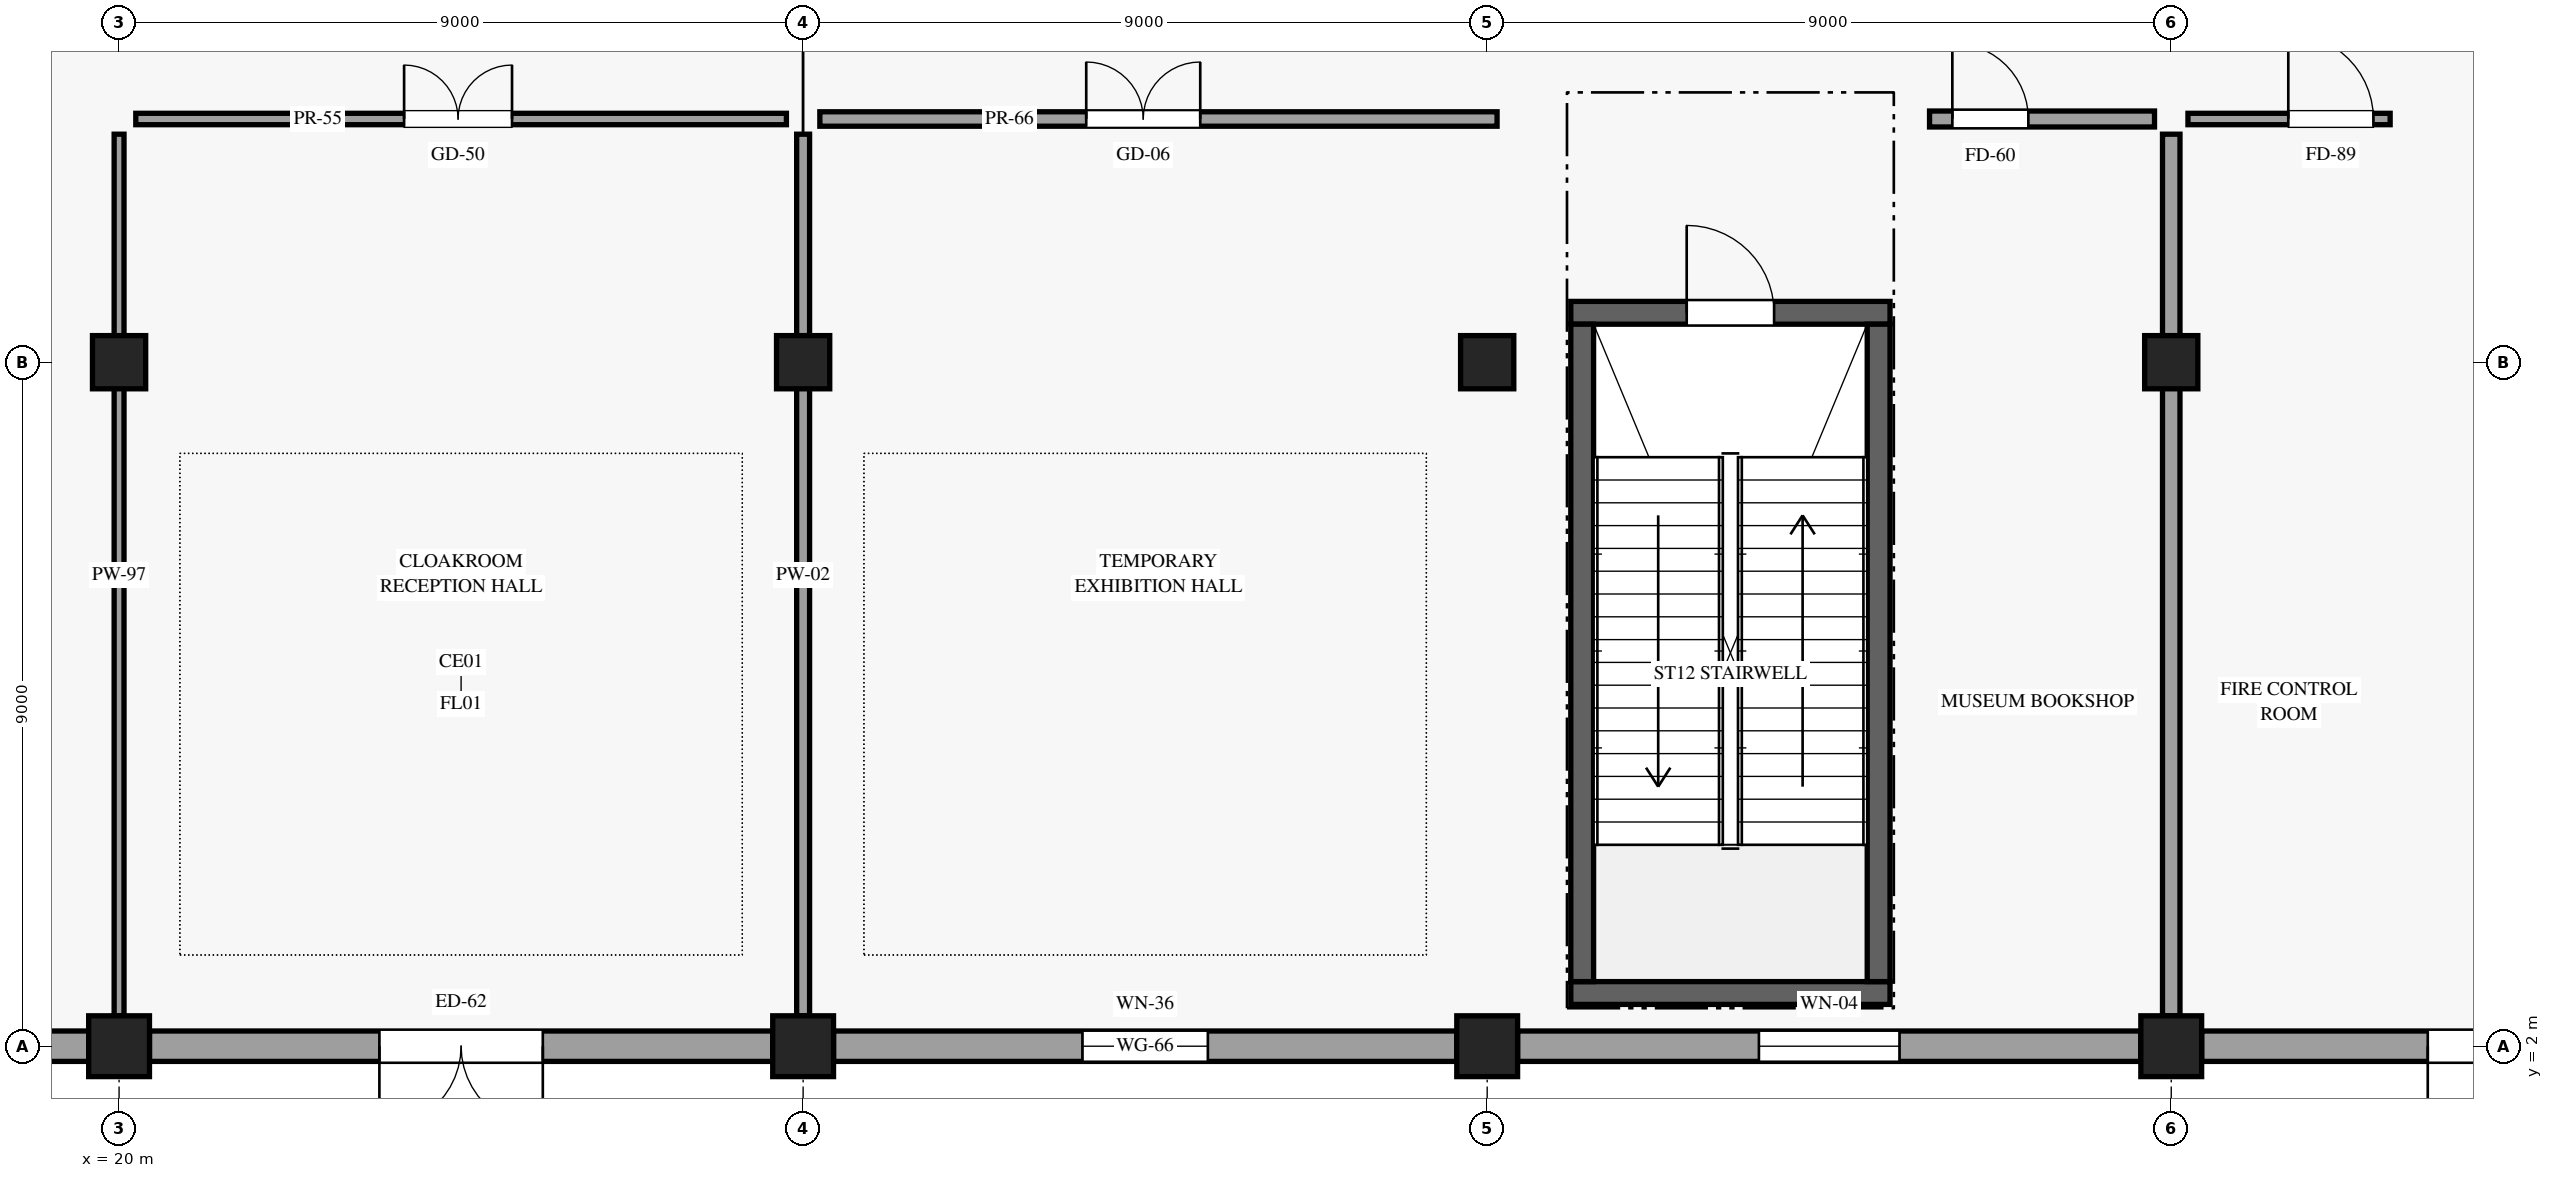
"""IFC4 building model, lengths in metres.
Left out: names, types, materials, properties, quantities, classifications, styles, units other than length and angle.
Written with IfcOpenShell. Run it as: python <this file> out.ifc"""

import sys

from ifc_helpers import new_model, si_unit, direction, frame, frame_2d, origin, origin_2d, place, context, subcontext, project, spatial, rectangle, extrude, element, fill, save


model = new_model("IFC4")
c1 = context("Model", 3, precision=1e-05, world=origin(), true_north=direction((0.0, 1.0)))
c2 = subcontext(c1, "Body", "Model", "MODEL_VIEW")
j1 = project(units=[si_unit("LENGTHUNIT", "METRE"), si_unit("PLANEANGLEUNIT", "RADIAN")], contexts=[c1])
p1 = place(None, origin())
s1 = spatial("IfcSite", under=j1, at=p1, CompositionType="ELEMENT")
p2 = place(p1, origin())
s2 = spatial("IfcBuilding", under=s1, at=p2, CompositionType="ELEMENT")
p3 = place(p2, origin())
s3 = spatial("IfcBuildingStorey", under=s2, at=p3, CompositionType="ELEMENT", Elevation=0.0)
p4 = place(p3, frame((20.0, 2.0, 0.0), z_axis=(0.0, 0.0, 1.0), x_axis=(1.0, 0.0, 0.0)))
e1 = element("IfcColumn", 1, at=p4, inside=s3, PredefinedType="COLUMN", context=c2, shape_type="SweptSolid", body=[
    extrude(rectangle(XDim=0.8, YDim=0.8, at=origin_2d()), origin(), (0.0, 0.0, 1.0), 5.4),
])
p5 = place(p3, frame((20.0, 11.0, 0.0), z_axis=(0.0, 0.0, 1.0), x_axis=(1.0, 0.0, 0.0)))
e2 = element("IfcColumn", 2, at=p5, inside=s3, PredefinedType="COLUMN", context=c2, shape_type="SweptSolid", body=[
    extrude(rectangle(XDim=0.7, YDim=0.7, at=origin_2d()), origin(), (0.0, 0.0, 1.0), 5.4),
])
p6 = place(p3, frame((29.0, 2.0, 0.0), z_axis=(0.0, 0.0, 1.0), x_axis=(1.0, 0.0, 0.0)))
e3 = element("IfcColumn", 3, at=p6, inside=s3, PredefinedType="COLUMN", context=c2, shape_type="SweptSolid", body=[
    extrude(rectangle(XDim=0.8, YDim=0.8, at=origin_2d()), origin(), (0.0, 0.0, 1.0), 5.4),
])
p7 = place(p3, frame((29.0, 11.0, 0.0), z_axis=(0.0, 0.0, 1.0), x_axis=(1.0, 0.0, 0.0)))
e4 = element("IfcColumn", 4, at=p7, inside=s3, PredefinedType="COLUMN", context=c2, shape_type="SweptSolid", body=[
    extrude(rectangle(XDim=0.7, YDim=0.7, at=origin_2d()), origin(), (0.0, 0.0, 1.0), 5.4),
])
p8 = place(p3, frame((38.0, 2.0, 0.0), z_axis=(0.0, 0.0, 1.0), x_axis=(1.0, 0.0, 0.0)))
e5 = element("IfcColumn", 5, at=p8, inside=s3, PredefinedType="COLUMN", context=c2, shape_type="SweptSolid", body=[
    extrude(rectangle(XDim=0.8, YDim=0.8, at=origin_2d()), origin(), (0.0, 0.0, 1.0), 5.4),
])
p9 = place(p3, frame((38.0, 11.0, 0.0), z_axis=(0.0, 0.0, 1.0), x_axis=(1.0, 0.0, 0.0)))
e6 = element("IfcColumn", 6, at=p9, inside=s3, PredefinedType="COLUMN", context=c2, shape_type="SweptSolid", body=[
    extrude(rectangle(XDim=0.7, YDim=0.7, at=origin_2d()), origin(), (0.0, 0.0, 1.0), 5.4),
])
p10 = place(p3, frame((47.0, 2.0, 0.0), z_axis=(0.0, 0.0, 1.0), x_axis=(1.0, 0.0, 0.0)))
e7 = element("IfcColumn", 7, at=p10, inside=s3, PredefinedType="COLUMN", context=c2, shape_type="SweptSolid", body=[
    extrude(rectangle(XDim=0.8, YDim=0.8, at=origin_2d()), origin(), (0.0, 0.0, 1.0), 5.4),
])
p11 = place(p3, frame((47.0, 11.0, 0.0), z_axis=(0.0, 0.0, 1.0), x_axis=(1.0, 0.0, 0.0)))
e8 = element("IfcColumn", 8, at=p11, inside=s3, PredefinedType="COLUMN", context=c2, shape_type="SweptSolid", body=[
    extrude(rectangle(XDim=0.7, YDim=0.7, at=origin_2d()), origin(), (0.0, 0.0, 1.0), 5.4),
])
p12 = place(p3, frame((11.4, 2.0, 0.0), z_axis=(0.0, 0.0, 1.0), x_axis=(1.0, 0.0, 0.0)))
e9 = element("IfcWall", 9, at=p12, inside=s3, PredefinedType="STANDARD", context=c2, shape_type="SweptSolid", body=[
    extrude(rectangle(XDim=8.2, YDim=0.4, at=frame_2d((4.1, 0.0))), origin(), (0.0, 0.0, 1.0), 4.095),
])
p13 = place(p12, frame((5.2, 0.0, 0.0), z_axis=(0.0, 0.0, 1.0), x_axis=(-1.0, 0.0, 0.0)))
e10 = element("IfcOpeningElement", 10, at=p13, cuts=e9, PredefinedType="OPENING", context=c2, shape_type="SweptSolid", body=[
    extrude(rectangle(XDim=2.2, YDim=2.5, at=frame_2d((1.1, 1.25))), frame((0.0, 0.21, 0.0), z_axis=(0.0, -1.0, 0.0), x_axis=(1.0, 0.0, 0.0)), (0.0, 0.0, 1.0), 0.42),
])
p14 = place(p3, frame((20.4, 2.0, 0.0), z_axis=(0.0, 0.0, 1.0), x_axis=(1.0, 0.0, 0.0)))
e11 = element("IfcWall", 11, at=p14, inside=s3, PredefinedType="STANDARD", context=c2, shape_type="SweptSolid", body=[
    extrude(rectangle(XDim=8.2, YDim=0.4, at=frame_2d((4.1, 0.0))), origin(), (0.0, 0.0, 1.0), 4.095),
])
p15 = place(p14, frame((5.175, 0.0, 0.0), z_axis=(0.0, 0.0, 1.0), x_axis=(-1.0, 0.0, 0.0)))
e12 = element("IfcOpeningElement", 12, at=p15, cuts=e11, PredefinedType="OPENING", context=c2, shape_type="SweptSolid", body=[
    extrude(rectangle(XDim=2.15, YDim=2.5, at=frame_2d((1.075, 1.25))), frame((0.0, 0.21, 0.0), z_axis=(0.0, -1.0, 0.0), x_axis=(1.0, 0.0, 0.0)), (0.0, 0.0, 1.0), 0.42),
])
p16 = place(p3, frame((29.4, 2.0, 0.0), z_axis=(0.0, 0.0, 1.0), x_axis=(1.0, 0.0, 0.0)))
e13 = element("IfcWall", 13, at=p16, inside=s3, PredefinedType="STANDARD", context=c2, shape_type="SweptSolid", body=[
    extrude(rectangle(XDim=8.2, YDim=0.4, at=frame_2d((4.1, 0.0))), origin(), (0.0, 0.0, 1.0), 4.095),
])
p17 = place(p16, frame((4.925, 0.0, 0.85), z_axis=(0.0, 0.0, 1.0), x_axis=(-1.0, 0.0, 0.0)))
e14 = element("IfcOpeningElement", 14, at=p17, cuts=e13, PredefinedType="OPENING", context=c2, shape_type="SweptSolid", body=[
    extrude(rectangle(XDim=1.65, YDim=2.0, at=frame_2d((0.825, 1.0))), frame((0.0, 0.21, 0.0), z_axis=(0.0, -1.0, 0.0), x_axis=(1.0, 0.0, 0.0)), (0.0, 0.0, 1.0), 0.42),
])
p18 = place(p3, frame((38.4, 2.0, 0.0), z_axis=(0.0, 0.0, 1.0), x_axis=(1.0, 0.0, 0.0)))
e15 = element("IfcWall", 15, at=p18, inside=s3, PredefinedType="STANDARD", context=c2, shape_type="SweptSolid", body=[
    extrude(rectangle(XDim=8.2, YDim=0.4, at=frame_2d((4.1, 0.0))), origin(), (0.0, 0.0, 1.0), 4.095),
])
p19 = place(p18, frame((5.025, 0.0, 0.85), z_axis=(0.0, 0.0, 1.0), x_axis=(-1.0, 0.0, 0.0)))
e16 = element("IfcOpeningElement", 16, at=p19, cuts=e15, PredefinedType="OPENING", context=c2, shape_type="SweptSolid", body=[
    extrude(rectangle(XDim=1.85, YDim=2.1, at=frame_2d((0.925, 1.05))), frame((0.0, 0.21, 0.0), z_axis=(0.0, -1.0, 0.0), x_axis=(1.0, 0.0, 0.0)), (0.0, 0.0, 1.0), 0.42),
])
p20 = place(p3, frame((47.4, 2.0, 0.0), z_axis=(0.0, 0.0, 1.0), x_axis=(1.0, 0.0, 0.0)))
e17 = element("IfcWall", 17, at=p20, inside=s3, PredefinedType="STANDARD", context=c2, shape_type="SweptSolid", body=[
    extrude(rectangle(XDim=8.2, YDim=0.4, at=frame_2d((4.1, 0.0))), origin(), (0.0, 0.0, 1.0), 4.095),
])
p21 = place(p20, frame((5.225, 0.0, 0.0), z_axis=(0.0, 0.0, 1.0), x_axis=(-1.0, 0.0, 0.0)))
e18 = element("IfcOpeningElement", 18, at=p21, cuts=e17, PredefinedType="OPENING", context=c2, shape_type="SweptSolid", body=[
    extrude(rectangle(XDim=2.25, YDim=2.5, at=frame_2d((1.125, 1.25))), frame((0.0, 0.21, 0.0), z_axis=(0.0, -1.0, 0.0), x_axis=(1.0, 0.0, 0.0)), (0.0, 0.0, 1.0), 0.42),
])
p22 = place(p3, frame((39.1, 11.65, 0.0), z_axis=(0.0, 0.0, 1.0), x_axis=(1.0, 0.0, 0.0)))
e19 = element("IfcWall", 19, at=p22, inside=s3, PredefinedType="SHEAR", context=c2, shape_type="SweptSolid", body=[
    extrude(rectangle(XDim=4.2, YDim=0.3, at=frame_2d((2.1, 0.0))), origin(), (0.0, 0.0, 1.0), 5.12),
])
p23 = place(p22, frame((1.525, 0.0, 0.0)))
e20 = element("IfcOpeningElement", 20, at=p23, cuts=e19, PredefinedType="OPENING", context=c2, shape_type="SweptSolid", body=[
    extrude(rectangle(XDim=1.15, YDim=2.2, at=frame_2d((0.575, 1.1))), frame((0.0, 0.16, 0.0), z_axis=(0.0, -1.0, 0.0), x_axis=(1.0, 0.0, 0.0)), (0.0, 0.0, 1.0), 0.32),
])
p24 = place(p3, frame((39.1, 2.7, 0.0), z_axis=(0.0, 0.0, 1.0), x_axis=(1.0, 0.0, 0.0)))
e21 = element("IfcWall", 21, at=p24, inside=s3, PredefinedType="SHEAR", context=c2, shape_type="SweptSolid", body=[
    extrude(rectangle(XDim=4.2, YDim=0.3, at=frame_2d((2.1, 0.0))), origin(), (0.0, 0.0, 1.0), 5.12),
])
for number, where, z_axis, x_axis in (
    (22, (39.25, 2.85, 0.0), (0.0, 0.0, 1.0), (0.0, 1.0, 0.0)),
    (23, (43.15, 2.85, 0.0), (0.0, 0.0, 1.0), (0.0, 1.0, 0.0)),
):
    element("IfcWall", number, at=place(p3, frame(where, z_axis=z_axis, x_axis=x_axis)), inside=s3, PredefinedType="SHEAR", context=c2, shape_type="SweptSolid", body=[
        extrude(rectangle(XDim=8.65, YDim=0.3, at=frame_2d((4.325, 0.0))), origin(), (0.0, 0.0, 1.0), 5.12),
    ])
p25 = place(p3, frame((20.0, 2.4, 0.0), z_axis=(0.0, 0.0, 1.0), x_axis=(0.0, 1.0, 0.0)))
e24 = element("IfcWall", 24, at=p25, inside=s3, PredefinedType="PARTITIONING", context=c2, shape_type="SweptSolid", body=[
    extrude(rectangle(XDim=11.6, YDim=0.13, at=frame_2d((5.8, 0.0))), origin(), (0.0, 0.0, 1.0), 4.095),
])
p26 = place(p3, frame((20.22, 14.2, 0.0), z_axis=(0.0, 0.0, 1.0), x_axis=(1.0, 0.0, 0.0)))
e25 = element("IfcWall", 25, at=p26, inside=s3, PredefinedType="PARTITIONING", context=c2, shape_type="SweptSolid", body=[
    extrude(rectangle(XDim=8.56, YDim=0.15, at=frame_2d((4.28, 0.0))), origin(), (0.0, 0.0, 1.0), 4.095),
])
p27 = place(p26, frame((3.53, 0.0, 0.0)))
e26 = element("IfcOpeningElement", 26, at=p27, cuts=e25, PredefinedType="OPENING", context=c2, shape_type="SweptSolid", body=[
    extrude(rectangle(XDim=1.42, YDim=2.3, at=frame_2d((0.71, 1.15))), frame((0.0, 0.085, 0.0), z_axis=(0.0, -1.0, 0.0), x_axis=(1.0, 0.0, 0.0)), (0.0, 0.0, 1.0), 0.17),
])
p28 = place(p3, frame((29.0, 2.4, 0.0), z_axis=(0.0, 0.0, 1.0), x_axis=(0.0, 1.0, 0.0)))
e27 = element("IfcWall", 27, at=p28, inside=s3, PredefinedType="PARTITIONING", context=c2, shape_type="SweptSolid", body=[
    extrude(rectangle(XDim=11.6, YDim=0.17, at=frame_2d((5.8, 0.0))), origin(), (0.0, 0.0, 1.0), 4.095),
])
p29 = place(p3, frame((29.22, 14.2, 0.0), z_axis=(0.0, 0.0, 1.0), x_axis=(1.0, 0.0, 0.0)))
e28 = element("IfcWall", 28, at=p29, inside=s3, PredefinedType="PARTITIONING", context=c2, shape_type="SweptSolid", body=[
    extrude(rectangle(XDim=8.91, YDim=0.19, at=frame_2d((4.455, 0.0))), origin(), (0.0, 0.0, 1.0), 4.095),
])
p30 = place(p29, frame((3.505, 0.0, 0.0)))
e29 = element("IfcOpeningElement", 29, at=p30, cuts=e28, PredefinedType="OPENING", context=c2, shape_type="SweptSolid", body=[
    extrude(rectangle(XDim=1.5, YDim=2.35, at=frame_2d((0.75, 1.175))), frame((0.0, 0.105, 0.0), z_axis=(0.0, -1.0, 0.0), x_axis=(1.0, 0.0, 0.0)), (0.0, 0.0, 1.0), 0.21),
])
p31 = place(p3, frame((43.82, 14.2, 0.0), z_axis=(0.0, 0.0, 1.0), x_axis=(1.0, 0.0, 0.0)))
e30 = element("IfcWall", 30, at=p31, inside=s3, PredefinedType="PARTITIONING", context=c2, shape_type="SweptSolid", body=[
    extrude(rectangle(XDim=2.96, YDim=0.21, at=frame_2d((1.48, 0.0))), origin(), (0.0, 0.0, 1.0), 4.095),
])
p32 = place(p31, frame((0.3, 0.0, 0.0)))
e31 = element("IfcOpeningElement", 31, at=p32, cuts=e30, PredefinedType="OPENING", context=c2, shape_type="SweptSolid", body=[
    extrude(rectangle(XDim=1.0, YDim=2.2, at=frame_2d((0.5, 1.1))), frame((0.0, 0.115, 0.0), z_axis=(0.0, -1.0, 0.0), x_axis=(1.0, 0.0, 0.0)), (0.0, 0.0, 1.0), 0.23),
])
p33 = place(p3, frame((47.0, 2.4, 0.0), z_axis=(0.0, 0.0, 1.0), x_axis=(0.0, 1.0, 0.0)))
e32 = element("IfcWall", 32, at=p33, inside=s3, PredefinedType="PARTITIONING", context=c2, shape_type="SweptSolid", body=[
    extrude(rectangle(XDim=11.6, YDim=0.23, at=frame_2d((5.8, 0.0))), origin(), (0.0, 0.0, 1.0), 4.095),
])
p34 = place(p3, frame((47.22, 14.2, 0.0), z_axis=(0.0, 0.0, 1.0), x_axis=(1.0, 0.0, 0.0)))
e33 = element("IfcWall", 33, at=p34, inside=s3, PredefinedType="PARTITIONING", context=c2, shape_type="SweptSolid", body=[
    extrude(rectangle(XDim=2.66, YDim=0.15, at=frame_2d((1.33, 0.0))), origin(), (0.0, 0.0, 1.0), 4.095),
])
p35 = place(p34, frame((1.32, 0.0, 0.0)))
e34 = element("IfcOpeningElement", 34, at=p35, cuts=e33, PredefinedType="OPENING", context=c2, shape_type="SweptSolid", body=[
    extrude(rectangle(XDim=1.12, YDim=2.26, at=frame_2d((0.56, 1.13))), frame((0.0, 0.085, 0.0), z_axis=(0.0, -1.0, 0.0), x_axis=(1.0, 0.0, 0.0)), (0.0, 0.0, 1.0), 0.17),
])
p36 = place(p15, origin())
e35 = element("IfcDoor", 35, at=p36, inside=s3, OperationType="DOUBLE_DOOR_SINGLE_SWING", PredefinedType="DOOR", context=c2, shape_type="SweptSolid", body=[
    extrude(rectangle(XDim=2.15, YDim=2.5, at=frame_2d((1.075, 1.25))), frame((0.0, 0.025, 0.0), z_axis=(0.0, -1.0, 0.0), x_axis=(1.0, 0.0, 0.0)), (0.0, 0.0, 1.0), 0.05),
])
fill(e12, e35)
p37 = place(p17, origin())
e36 = element("IfcWindow", 36, at=p37, inside=s3, PartitioningType="SINGLE_PANEL", PredefinedType="WINDOW", context=c2, shape_type="SweptSolid", body=[
    extrude(rectangle(XDim=1.65, YDim=2.0, at=frame_2d((0.825, 1.0))), frame((0.0, 0.03, 0.0), z_axis=(0.0, -1.0, 0.0), x_axis=(1.0, 0.0, 0.0)), (0.0, 0.0, 1.0), 0.06),
])
fill(e14, e36)
p38 = place(p19, origin())
e37 = element("IfcWindow", 37, at=p38, inside=s3, PartitioningType="SINGLE_PANEL", PredefinedType="WINDOW", context=c2, shape_type="SweptSolid", body=[
    extrude(rectangle(XDim=1.85, YDim=2.1, at=frame_2d((0.925, 1.05))), frame((0.0, 0.03, 0.0), z_axis=(0.0, -1.0, 0.0), x_axis=(1.0, 0.0, 0.0)), (0.0, 0.0, 1.0), 0.06),
])
fill(e16, e37)
p39 = place(p21, origin())
e38 = element("IfcDoor", 38, at=p39, inside=s3, OperationType="DOUBLE_DOOR_SINGLE_SWING", PredefinedType="DOOR", context=c2, shape_type="SweptSolid", body=[
    extrude(rectangle(XDim=2.25, YDim=2.5, at=frame_2d((1.125, 1.25))), frame((0.0, 0.025, 0.0), z_axis=(0.0, -1.0, 0.0), x_axis=(1.0, 0.0, 0.0)), (0.0, 0.0, 1.0), 0.05),
])
fill(e18, e38)
p40 = place(p23, origin())
e39 = element("IfcDoor", 39, at=p40, inside=s3, OperationType="SINGLE_SWING_LEFT", PredefinedType="DOOR", context=c2, shape_type="SweptSolid", body=[
    extrude(rectangle(XDim=1.15, YDim=2.2, at=frame_2d((0.575, 1.1))), frame((0.0, 0.025, 0.0), z_axis=(0.0, -1.0, 0.0), x_axis=(1.0, 0.0, 0.0)), (0.0, 0.0, 1.0), 0.05),
])
fill(e20, e39)
p41 = place(p27, origin())
e40 = element("IfcDoor", 40, at=p41, inside=s3, OperationType="DOUBLE_DOOR_SINGLE_SWING", PredefinedType="DOOR", context=c2, shape_type="SweptSolid", body=[
    extrude(rectangle(XDim=1.42, YDim=2.3, at=frame_2d((0.71, 1.15))), frame((0.0, 0.025, 0.0), z_axis=(0.0, -1.0, 0.0), x_axis=(1.0, 0.0, 0.0)), (0.0, 0.0, 1.0), 0.05),
])
fill(e26, e40)
p42 = place(p30, origin())
e41 = element("IfcDoor", 41, at=p42, inside=s3, OperationType="DOUBLE_DOOR_SINGLE_SWING", PredefinedType="DOOR", context=c2, shape_type="SweptSolid", body=[
    extrude(rectangle(XDim=1.5, YDim=2.35, at=frame_2d((0.75, 1.175))), frame((0.0, 0.025, 0.0), z_axis=(0.0, -1.0, 0.0), x_axis=(1.0, 0.0, 0.0)), (0.0, 0.0, 1.0), 0.05),
])
fill(e29, e41)
p43 = place(p32, origin())
e42 = element("IfcDoor", 42, at=p43, inside=s3, OperationType="SINGLE_SWING_LEFT", PredefinedType="DOOR", context=c2, shape_type="SweptSolid", body=[
    extrude(rectangle(XDim=1.0, YDim=2.2, at=frame_2d((0.5, 1.1))), frame((0.0, 0.025, 0.0), z_axis=(0.0, -1.0, 0.0), x_axis=(1.0, 0.0, 0.0)), (0.0, 0.0, 1.0), 0.05),
])
fill(e31, e42)
p44 = place(p35, origin())
e43 = element("IfcDoor", 43, at=p44, inside=s3, OperationType="SINGLE_SWING_LEFT", PredefinedType="DOOR", context=c2, shape_type="SweptSolid", body=[
    extrude(rectangle(XDim=1.12, YDim=2.26, at=frame_2d((0.56, 1.13))), frame((0.0, 0.025, 0.0), z_axis=(0.0, -1.0, 0.0), x_axis=(1.0, 0.0, 0.0)), (0.0, 0.0, 1.0), 0.05),
])
fill(e34, e43)
save(model, sys.argv[1])
